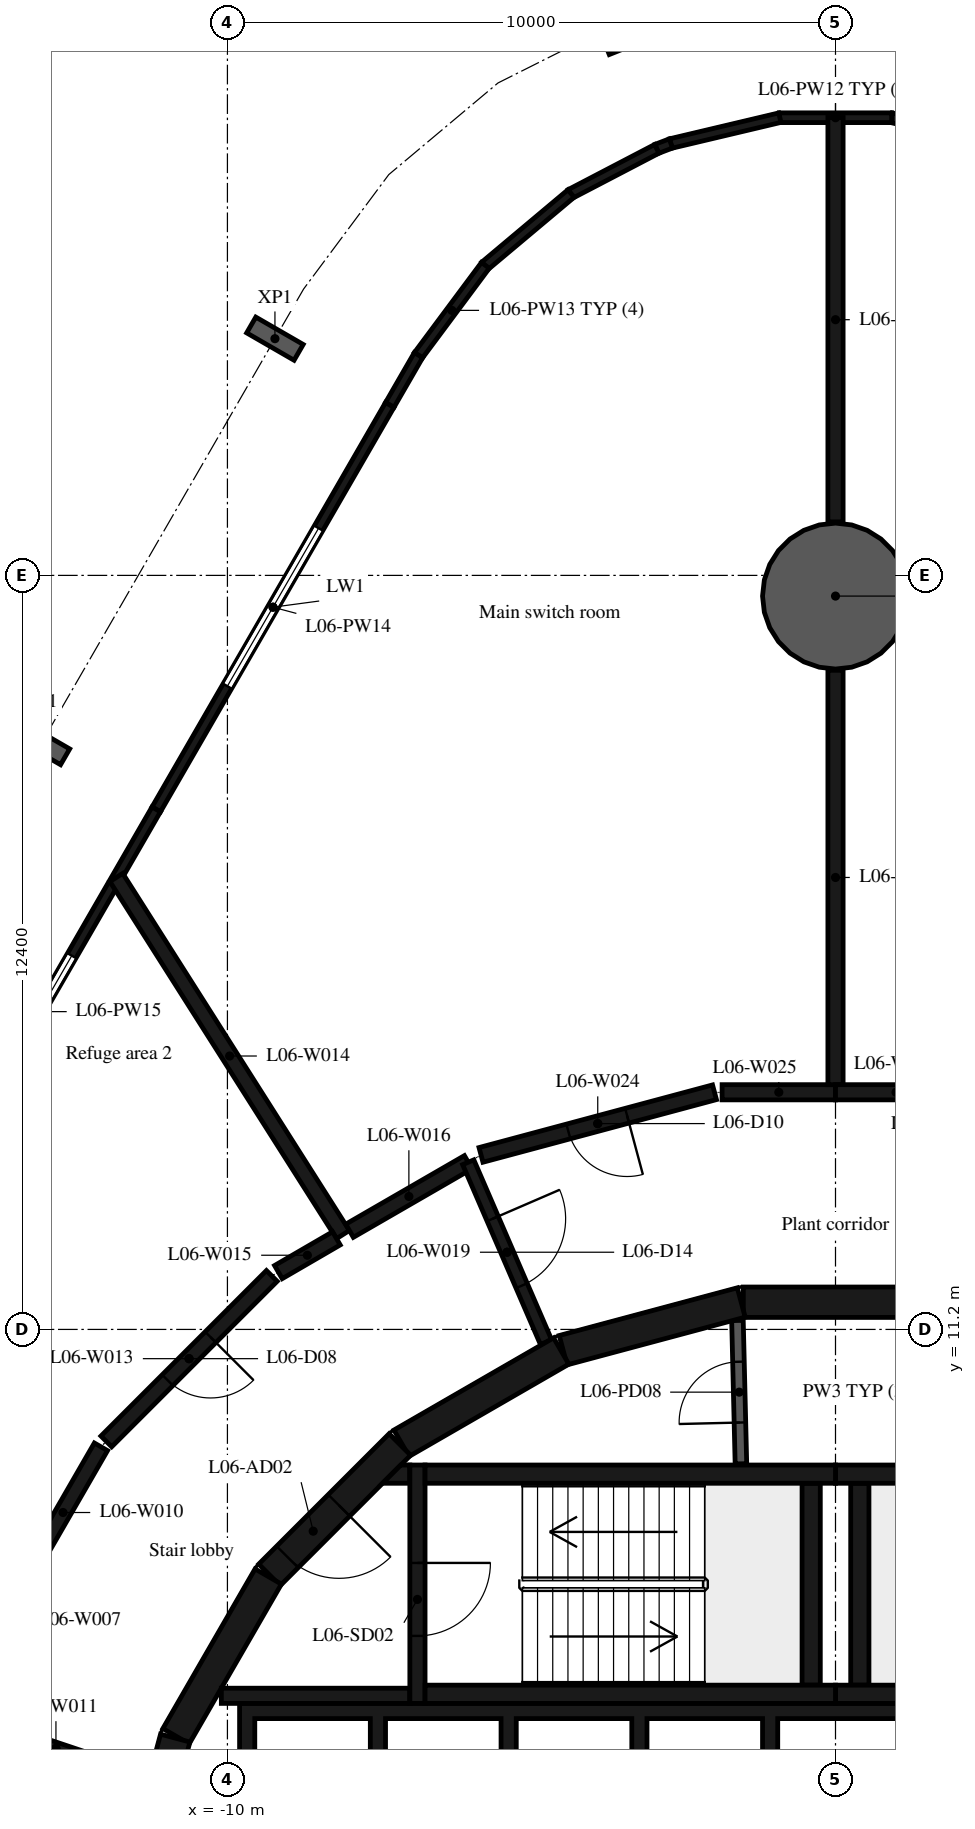
"""IFC4 building model, lengths in metres.
Left out: names, types, materials, properties, quantities, classifications, styles, units other than length and angle.
Written with IfcOpenShell. Run it as: python <this file> out.ifc"""

import sys

from ifc_helpers import new_model, si_unit, direction, frame, frame_2d, origin, origin_2d, place, context, subcontext, project, spatial, polyline, rectangle, hollow_circle, i_section, outline, extrude, element, fill, save


model = new_model("IFC4")
c1 = context("Model", 3, precision=1e-05, world=origin(), true_north=direction((0.0, 1.0)))
c2 = subcontext(c1, "Body", "Model", "MODEL_VIEW")
j1 = project(units=[si_unit("LENGTHUNIT", "METRE"), si_unit("PLANEANGLEUNIT", "RADIAN")], contexts=[c1])
p1 = place(None, origin())
s1 = spatial("IfcSite", under=j1, at=p1, CompositionType="ELEMENT")
p2 = place(p1, origin())
s2 = spatial("IfcBuilding", under=s1, at=p2, CompositionType="ELEMENT")
p3 = place(p2, frame((0.0, 0.0, 33.0)))
s3 = spatial("IfcBuildingStorey", under=s2, at=p3, CompositionType="ELEMENT", Elevation=33.0)
p4 = place(p3, frame((0.0, 23.26, -0.45), z_axis=(0.0, 0.0, 1.0), x_axis=(1.0, 0.0, 0.0)))
e1 = element("IfcColumn", 1, at=p4, inside=s3, PredefinedType="COLUMN", context=c2, shape_type="SweptSolid", body=[
    extrude(hollow_circle(Radius=1.2, WallThickness=0.06, at=origin_2d()), origin(), (0.0, 0.0, 1.0), 5.4),
])
for number, where, z_axis, x_axis in (
    (2, (-3.748, 32.639, -0.45), (0.0, 0.0, 1.0), (0.929, 0.371, 0.0)),
    (3, (-9.219, 27.493, -0.45), (0.0, 0.0, 1.0), (0.5, 0.866, 0.0)),
    (4, (-13.059, 20.842, -0.45), (0.0, 0.0, 1.0), (0.5, 0.866, 0.0)),
):
    element("IfcColumn", number, at=place(p3, frame(where, z_axis=z_axis, x_axis=x_axis)), inside=s3, PredefinedType="COLUMN", context=c2, shape_type="SweptSolid", body=[
        extrude(i_section(OverallWidth=0.3, OverallDepth=0.9, WebThickness=0.019, FlangeThickness=0.035, FilletRadius=0.03, at=origin_2d()), origin(), (0.0, 0.0, 1.0), 5.4),
    ])
p5 = place(p3, frame((2.711, 30.702, 0.0), z_axis=(0.0, 0.0, 1.0), x_axis=(-0.973077946325, 0.230476268575, 0.0)))
e5 = element("IfcWall", 5, at=p5, inside=s3, PredefinedType="STANDARD", context=c2, shape_type="SweptSolid", body=[
    extrude(rectangle(XDim=1.846, YDim=0.16, at=frame_2d((0.923, 0.0))), origin(), (0.0, 0.0, 1.0), 4.95),
])
p6 = place(p3, frame((0.924, 31.126, 0.0), z_axis=(0.0, 0.0, 1.0), x_axis=(-1.0, 0.0, 0.0)))
e6 = element("IfcWall", 6, at=p6, inside=s3, PredefinedType="STANDARD", context=c2, shape_type="SweptSolid", body=[
    extrude(rectangle(XDim=1.848, YDim=0.16, at=frame_2d((0.924, 0.0))), origin(), (0.0, 0.0, 1.0), 4.95),
])
p7 = place(p3, frame((-0.915, 31.127, 0.0), z_axis=(0.0, 0.0, 1.0), x_axis=(-0.973077946325, -0.230476268575, 0.0)))
e7 = element("IfcWall", 7, at=p7, inside=s3, PredefinedType="STANDARD", context=c2, shape_type="SweptSolid", body=[
    extrude(rectangle(XDim=1.846, YDim=0.16, at=frame_2d((0.923, 0.0))), origin(), (0.0, 0.0, 1.0), 4.95),
])
p8 = place(p3, frame((-2.706, 30.703, 0.0), z_axis=(0.0, 0.0, 1.0), x_axis=(-0.934301433369, -0.356483985059, 0.0)))
e8 = element("IfcWall", 8, at=p8, inside=s3, PredefinedType="STANDARD", context=c2, shape_type="SweptSolid", body=[
    extrude(rectangle(XDim=0.249, YDim=0.16, at=frame_2d((0.125, 0.0))), origin(), (0.0, 0.0, 1.0), 4.95),
])
p9 = place(p3, frame((-2.939, 30.614, 0.0), z_axis=(0.0, 0.0, 1.0), x_axis=(-0.886563052372, -0.462607775734, 0.0)))
e9 = element("IfcWall", 9, at=p9, inside=s3, PredefinedType="STANDARD", context=c2, shape_type="SweptSolid", body=[
    extrude(rectangle(XDim=1.598, YDim=0.16, at=frame_2d((0.799, 0.0))), origin(), (0.0, 0.0, 1.0), 4.95),
])
p10 = place(p3, frame((-4.349, 29.88, 0.0), z_axis=(0.0, 0.0, 1.0), x_axis=(-0.766050926865, -0.64277988258, 0.0)))
e10 = element("IfcWall", 10, at=p10, inside=s3, PredefinedType="STANDARD", context=c2, shape_type="SweptSolid", body=[
    extrude(rectangle(XDim=1.848, YDim=0.16, at=frame_2d((0.924, 0.0))), origin(), (0.0, 0.0, 1.0), 4.95),
])
p11 = place(p3, frame((-5.758, 28.698, 0.0), z_axis=(0.0, 0.0, 1.0), x_axis=(-0.597202782017, -0.802090292393, 0.0)))
e11 = element("IfcWall", 11, at=p11, inside=s3, PredefinedType="STANDARD", context=c2, shape_type="SweptSolid", body=[
    extrude(rectangle(XDim=1.846, YDim=0.16, at=frame_2d((0.923, 0.0))), origin(), (0.0, 0.0, 1.0), 4.95),
])
p12 = place(p3, frame((-6.858, 27.222, 0.0), z_axis=(0.0, 0.0, 1.0), x_axis=(-0.499916178513, -0.866073792734, 0.0)))
e12 = element("IfcWall", 12, at=p12, inside=s3, PredefinedType="STANDARD", context=c2, shape_type="SweptSolid", body=[
    extrude(rectangle(XDim=0.946, YDim=0.16, at=frame_2d((0.473, 0.0))), origin(), (0.0, 0.0, 1.0), 4.95),
])
p13 = place(p3, frame((-7.331, 26.403, 0.0), z_axis=(0.0, 0.0, 1.0), x_axis=(-0.500005879718, -0.866022009101, 0.0)))
e13 = element("IfcWall", 13, at=p13, inside=s3, PredefinedType="STANDARD", context=c2, shape_type="SweptSolid", body=[
    extrude(rectangle(XDim=7.68, YDim=0.16, at=frame_2d((3.84, 0.0))), origin(), (0.0, 0.0, 1.0), 4.95),
])
p14 = place(p13, frame((2.34, 0.0, 1.0)))
e14 = element("IfcOpeningElement", 14, at=p14, cuts=e13, PredefinedType="OPENING", context=c2, shape_type="SweptSolid", body=[
    extrude(rectangle(XDim=3.0, YDim=2.2, at=frame_2d((1.5, 1.1))), frame((0.0, 0.09, 0.0), z_axis=(0.0, -1.0, 0.0), x_axis=(1.0, 0.0, 0.0)), (0.0, 0.0, 1.0), 0.18),
])
p15 = place(p3, frame((-11.171, 19.752, 0.0), z_axis=(0.0, 0.0, 1.0), x_axis=(-0.500005879718, -0.866022009101, 0.0)))
e15 = element("IfcWall", 15, at=p15, inside=s3, PredefinedType="STANDARD", context=c2, shape_type="SweptSolid", body=[
    extrude(rectangle(XDim=7.68, YDim=0.16, at=frame_2d((3.84, 0.0))), origin(), (0.0, 0.0, 1.0), 4.95),
])
p16 = place(p15, frame((2.778, 0.0, 1.0)))
e16 = element("IfcOpeningElement", 16, at=p16, cuts=e15, PredefinedType="OPENING", context=c2, shape_type="SweptSolid", body=[
    extrude(rectangle(XDim=3.0, YDim=2.2, at=frame_2d((1.5, 1.1))), frame((0.0, 0.09, 0.0), z_axis=(0.0, -1.0, 0.0), x_axis=(1.0, 0.0, 0.0)), (0.0, 0.0, 1.0), 0.18),
])
for number, where, z_axis, x_axis in (
    (17, (1.516, 11.647, 0.0), (0.0, 0.0, 1.0), (-1.0, 0.0, 0.0)),
    (18, (-1.55, 11.643, 0.0), (0.0, 0.0, 1.0), (-0.966, -0.259, 0.0)),
    (19, (-4.51, 10.845, 0.0), (0.0, 0.0, 1.0), (-0.866, -0.5, 0.0)),
):
    element("IfcWall", number, at=place(p3, frame(where, z_axis=z_axis, x_axis=x_axis)), inside=s3, PredefinedType="SHEAR", context=c2, shape_type="SweptSolid", body=[
        extrude(rectangle(XDim=3.033, YDim=0.5, at=frame_2d((1.516, 0.0))), origin(), (0.0, 0.0, 1.0), 4.95),
    ])
p17 = place(p3, frame((-7.164, 9.308, 0.0), z_axis=(0.0, 0.0, 1.0), x_axis=(-0.707106781187, -0.707106781187, 0.0)))
e20 = element("IfcWall", 20, at=p17, inside=s3, PredefinedType="SHEAR", context=c2, shape_type="SweptSolid", body=[
    extrude(rectangle(XDim=3.032, YDim=0.5, at=frame_2d((1.516, 0.0))), origin(), (0.0, 0.0, 1.0), 4.95),
])
p18 = place(p17, frame((1.416, 0.0, 0.0)))
e21 = element("IfcOpeningElement", 21, at=p18, cuts=e20, PredefinedType="OPENING", context=c2, shape_type="SweptSolid", body=[
    extrude(rectangle(XDim=1.2, YDim=2.1, at=frame_2d((0.6, 1.05))), frame((0.0, 0.26, 0.0), z_axis=(0.0, -1.0, 0.0), x_axis=(1.0, 0.0, 0.0)), (0.0, 0.0, 1.0), 0.52),
])
for number, where, z_axis, x_axis in (
    (22, (-9.329, 7.137, 0.0), (0.0, 0.0, 1.0), (-0.5, -0.866, 0.0)),
    (23, (-10.858, 4.479, 0.0), (0.0, 0.0, 1.0), (-0.259, -0.966, 0.0)),
):
    element("IfcWall", number, at=place(p3, frame(where, z_axis=z_axis, x_axis=x_axis)), inside=s3, PredefinedType="SHEAR", context=c2, shape_type="SweptSolid", body=[
        extrude(rectangle(XDim=3.033, YDim=0.5, at=frame_2d((1.516, 0.0))), origin(), (0.0, 0.0, 1.0), 4.95),
    ])
for number, where, z_axis, x_axis in (
    (24, (0.0, 5.2, 0.0), (0.0, 0.0, 1.0), (1.0, 0.0, 0.0)),
    (25, (0.0, 8.82, 0.0), (0.0, 0.0, 1.0), (1.0, 0.0, 0.0)),
):
    element("IfcWall", number, at=place(p3, frame(where, z_axis=z_axis, x_axis=x_axis)), inside=s3, PredefinedType="SHEAR", context=c2, shape_type="SweptSolid", body=[
        extrude(rectangle(XDim=6.75, YDim=0.3, at=frame_2d((3.375, 0.0))), origin(), (0.0, 0.0, 1.0), 4.95),
    ])
p19 = place(p3, frame((0.4, 5.35, 0.0), z_axis=(0.0, 0.0, 1.0), x_axis=(0.0, 1.0, 0.0)))
e26 = element("IfcWall", 26, at=p19, inside=s3, PredefinedType="SHEAR", context=c2, shape_type="SweptSolid", body=[
    extrude(rectangle(XDim=3.32, YDim=0.3, at=frame_2d((1.66, 0.0))), origin(), (0.0, 0.0, 1.0), 4.95),
])
for number, where, z_axis, x_axis in (
    (27, (-6.75, 5.2, 0.0), (0.0, 0.0, 1.0), (1.0, 0.0, 0.0)),
    (28, (-6.75, 8.82, 0.0), (0.0, 0.0, 1.0), (1.0, 0.0, 0.0)),
):
    element("IfcWall", number, at=place(p3, frame(where, z_axis=z_axis, x_axis=x_axis)), inside=s3, PredefinedType="SHEAR", context=c2, shape_type="SweptSolid", body=[
        extrude(rectangle(XDim=6.75, YDim=0.3, at=frame_2d((3.375, 0.0))), origin(), (0.0, 0.0, 1.0), 4.95),
    ])
p20 = place(p3, frame((-0.4, 5.35, 0.0), z_axis=(0.0, 0.0, 1.0), x_axis=(0.0, 1.0, 0.0)))
e29 = element("IfcWall", 29, at=p20, inside=s3, PredefinedType="SHEAR", context=c2, shape_type="SweptSolid", body=[
    extrude(rectangle(XDim=3.32, YDim=0.3, at=frame_2d((1.66, 0.0))), origin(), (0.0, 0.0, 1.0), 4.95),
])
p21 = place(p3, frame((-6.875, 8.97, 0.0), z_axis=(0.0, 0.0, 1.0), x_axis=(0.0, -1.0, 0.0)))
e30 = element("IfcWall", 30, at=p21, inside=s3, PredefinedType="SHEAR", context=c2, shape_type="SweptSolid", body=[
    extrude(rectangle(XDim=3.92, YDim=0.25, at=frame_2d((1.96, 0.0))), origin(), (0.0, 0.0, 1.0), 4.95),
])
p22 = place(p21, frame((1.61, 0.0, 0.0)))
e31 = element("IfcOpeningElement", 31, at=p22, cuts=e30, PredefinedType="OPENING", context=c2, shape_type="SweptSolid", body=[
    extrude(rectangle(XDim=1.2, YDim=2.1, at=frame_2d((0.6, 1.05))), frame((0.0, 0.135, 0.0), z_axis=(0.0, -1.0, 0.0), x_axis=(1.0, 0.0, 0.0)), (0.0, 0.0, 1.0), 0.27),
])
p23 = place(p3, frame((-7.0, 5.175, 0.0), z_axis=(0.0, 0.0, 1.0), x_axis=(-1.0, 0.0, 0.0)))
e32 = element("IfcWall", 32, at=p23, inside=s3, PredefinedType="SHEAR", context=c2, shape_type="SweptSolid", body=[
    extrude(rectangle(XDim=3.1, YDim=0.25, at=frame_2d((1.55, 0.0))), origin(), (0.0, 0.0, 1.0), 4.95),
])
p24 = place(p3, origin())
e33 = element("IfcWall", 33, at=p24, inside=s3, PredefinedType="SHEAR", context=c2, shape_type="SweptSolid", body=[
    extrude(outline(polyline([(-7.148, 8.97), (-7.0, 8.97), (-7.0, 8.67), (-7.448, 8.67), (-7.148, 8.97)])), origin(), (0.0, 0.0, 1.0), 4.95),
])
p25 = place(p3, origin())
e34 = element("IfcWall", 34, at=p25, inside=s3, PredefinedType="SHEAR", context=c2, shape_type="SweptSolid", body=[
    extrude(outline(polyline([(-9.55, 4.8), (-7.65, 4.8), (-7.65, 1.9), (-7.4, 1.9), (-7.4, 4.8), (-5.5, 4.8), (-5.5, 1.9), (-5.25, 1.9), (-5.25, 4.8), (-3.35, 4.8), (-3.35, 1.9), (-3.1, 1.9), (-3.1, 4.8), (-1.2, 4.8), (-1.2, 1.9), (-0.95, 1.9), (-0.95, 4.8), (3.1, 4.8), (3.1, 1.9), (3.35, 1.9), (3.35, 4.8), (5.25, 4.8), (5.25, 1.9), (5.5, 1.9), (5.5, 4.8), (7.4, 4.8), (7.4, 1.9), (7.65, 1.9), (7.65, 4.8), (9.55, 4.8), (9.55, 1.9), (9.8, 1.9), (9.8, 4.8), (9.8, 5.05), (-9.8, 5.05), (-9.8, 4.8), (-9.8, 1.9), (-9.55, 1.9), (-9.55, 4.8)])), origin(), (0.0, 0.0, 1.0), 4.95),
])
p26 = place(p3, frame((-1.555, 8.99, 0.0), z_axis=(0.0, 0.0, 1.0), x_axis=(-0.024125549686, 0.999708936567, 0.0)))
e35 = element("IfcWall", 35, at=p26, inside=s3, PredefinedType="PARTITIONING", context=c2, shape_type="SweptSolid", body=[
    extrude(rectangle(XDim=2.358, YDim=0.19, at=frame_2d((1.179, 0.0))), origin(), (0.0, 0.0, 1.0), 4.95),
])
p27 = place(p26, frame((0.679, 0.0, 0.0)))
e36 = element("IfcOpeningElement", 36, at=p27, cuts=e35, PredefinedType="OPENING", context=c2, shape_type="SweptSolid", body=[
    extrude(rectangle(XDim=1.0, YDim=2.4, at=frame_2d((0.5, 1.2))), frame((0.0, 0.105, 0.0), z_axis=(0.0, -1.0, 0.0), x_axis=(1.0, 0.0, 0.0)), (0.0, 0.0, 1.0), 0.21),
])
p28 = place(p3, frame((-12.08, 9.27, 0.0), z_axis=(0.0, 0.0, 1.0), x_axis=(-0.499821239653, -0.866128586522, 0.0)))
e37 = element("IfcWall", 37, at=p28, inside=s3, PredefinedType="PARTITIONING", context=c2, shape_type="SweptSolid", body=[
    extrude(rectangle(XDim=2.496, YDim=0.25, at=frame_2d((1.248, 0.0))), origin(), (0.0, 0.0, 1.0), 4.95),
])
p29 = place(p3, frame((-11.3, 3.8, 0.0), z_axis=(0.0, 0.0, 1.0), x_axis=(-0.94805712629, 0.318100118345, 0.0)))
e38 = element("IfcWall", 38, at=p29, inside=s3, PredefinedType="PARTITIONING", context=c2, shape_type="SweptSolid", body=[
    extrude(rectangle(XDim=3.207, YDim=0.2, at=frame_2d((1.603, 0.0))), origin(), (0.0, 0.0, 1.0), 4.95),
])
p30 = place(p29, frame((1.003, 0.0, 0.0)))
e39 = element("IfcOpeningElement", 39, at=p30, cuts=e38, PredefinedType="OPENING", context=c2, shape_type="SweptSolid", body=[
    extrude(rectangle(XDim=1.2, YDim=2.1, at=frame_2d((0.6, 1.05))), frame((0.0, 0.11, 0.0), z_axis=(0.0, -1.0, 0.0), x_axis=(1.0, 0.0, 0.0)), (0.0, 0.0, 1.0), 0.22),
])
p31 = place(p3, frame((-9.27, 12.08, 0.0), z_axis=(0.0, 0.0, 1.0), x_axis=(-0.707106781187, -0.707106781187, 0.0)))
e40 = element("IfcWall", 40, at=p31, inside=s3, PredefinedType="PARTITIONING", context=c2, shape_type="SweptSolid", body=[
    extrude(rectangle(XDim=3.849, YDim=0.25, at=frame_2d((1.925, 0.0))), origin(), (0.0, 0.0, 1.0), 4.95),
])
p32 = place(p31, frame((1.425, 0.0, 0.0)))
e41 = element("IfcOpeningElement", 41, at=p32, cuts=e40, PredefinedType="OPENING", context=c2, shape_type="SweptSolid", body=[
    extrude(rectangle(XDim=1.0, YDim=2.1, at=frame_2d((0.5, 1.05))), frame((0.0, 0.135, 0.0), z_axis=(0.0, -1.0, 0.0), x_axis=(1.0, 0.0, 0.0)), (0.0, 0.0, 1.0), 0.27),
])
p33 = place(p3, frame((-8.1, 12.76, 0.0), z_axis=(0.0, 0.0, 1.0), x_axis=(-0.535848500159, 0.844314150585, 0.0)))
e42 = element("IfcWall", 42, at=p33, inside=s3, PredefinedType="PARTITIONING", context=c2, shape_type="SweptSolid", body=[
    extrude(rectangle(XDim=6.955, YDim=0.25, at=frame_2d((3.478, 0.0))), origin(), (0.0, 0.0, 1.0), 4.95),
])
p34 = place(p3, frame((-8.208, 12.697, 0.0), z_axis=(0.0, 0.0, 1.0), x_axis=(-0.86455637663, -0.502535841138, 0.0)))
e43 = element("IfcWall", 43, at=p34, inside=s3, PredefinedType="PARTITIONING", context=c2, shape_type="SweptSolid", body=[
    extrude(rectangle(XDim=1.103, YDim=0.25, at=frame_2d((0.552, 0.0))), origin(), (0.0, 0.0, 1.0), 4.95),
])
p35 = place(p3, frame((-7.992, 12.823, 0.0), z_axis=(0.0, 0.0, 1.0), x_axis=(0.865900522319, 0.500216238688, 0.0)))
e44 = element("IfcWall", 44, at=p35, inside=s3, PredefinedType="PARTITIONING", context=c2, shape_type="SweptSolid", body=[
    extrude(rectangle(XDim=2.254, YDim=0.25, at=frame_2d((1.127, 0.0))), origin(), (0.0, 0.0, 1.0), 4.95),
])
p36 = place(p3, frame((-6.04, 13.949, 0.0), z_axis=(0.0, 0.0, 1.0), x_axis=(0.396905977672, -0.917859272922, 0.0)))
e45 = element("IfcWall", 45, at=p36, inside=s3, PredefinedType="PARTITIONING", context=c2, shape_type="SweptSolid", body=[
    extrude(rectangle(XDim=3.224, YDim=0.2, at=frame_2d((1.612, 0.0))), origin(), (0.0, 0.0, 1.0), 4.95),
])
p37 = place(p36, frame((1.012, 0.0, 0.0)))
e46 = element("IfcOpeningElement", 46, at=p37, cuts=e45, PredefinedType="OPENING", context=c2, shape_type="SweptSolid", body=[
    extrude(rectangle(XDim=1.2, YDim=2.1, at=frame_2d((0.6, 1.05))), frame((0.0, 0.11, 0.0), z_axis=(0.0, -1.0, 0.0), x_axis=(1.0, 0.0, 0.0)), (0.0, 0.0, 1.0), 0.22),
])
p38 = place(p3, frame((-1.99, 15.1, 0.0), z_axis=(0.0, 0.0, 1.0), x_axis=(-0.965857829358, -0.259072679895, 0.0)))
e47 = element("IfcWall", 47, at=p38, inside=s3, PredefinedType="PARTITIONING", context=c2, shape_type="SweptSolid", body=[
    extrude(rectangle(XDim=3.976, YDim=0.25, at=frame_2d((1.988, 0.0))), origin(), (0.0, 0.0, 1.0), 4.95),
])
p39 = place(p38, frame((1.488, 0.0, 0.0)))
e48 = element("IfcOpeningElement", 48, at=p39, cuts=e47, PredefinedType="OPENING", context=c2, shape_type="SweptSolid", body=[
    extrude(rectangle(XDim=1.0, YDim=2.1, at=frame_2d((0.5, 1.05))), frame((0.0, 0.135, 0.0), z_axis=(0.0, -1.0, 0.0), x_axis=(1.0, 0.0, 0.0)), (0.0, 0.0, 1.0), 0.27),
])
p40 = place(p3, frame((0.0, 15.1, 0.0), z_axis=(0.0, 0.0, 1.0), x_axis=(-1.0, 0.0, 0.0)))
e49 = element("IfcWall", 49, at=p40, inside=s3, PredefinedType="PARTITIONING", context=c2, shape_type="SweptSolid", body=[
    extrude(rectangle(XDim=1.865, YDim=0.25, at=frame_2d((0.933, 0.0))), origin(), (0.0, 0.0, 1.0), 4.95),
])
p41 = place(p3, frame((0.0, 15.225, 0.0), z_axis=(0.0, 0.0, 1.0), x_axis=(0.0, 1.0, 0.0)))
e50 = element("IfcWall", 50, at=p41, inside=s3, PredefinedType="PARTITIONING", context=c2, shape_type="SweptSolid", body=[
    extrude(rectangle(XDim=6.815, YDim=0.25, at=frame_2d((3.407, 0.0))), origin(), (0.0, 0.0, 1.0), 4.95),
])
p42 = place(p3, frame((0.0, 24.48, 0.0), z_axis=(0.0, 0.0, 1.0), x_axis=(0.0, 1.0, 0.0)))
e51 = element("IfcWall", 51, at=p42, inside=s3, PredefinedType="PARTITIONING", context=c2, shape_type="SweptSolid", body=[
    extrude(rectangle(XDim=6.65, YDim=0.25, at=frame_2d((3.325, 0.0))), origin(), (0.0, 0.0, 1.0), 4.95),
])
p43 = place(p3, frame((1.99, 15.1, 0.0), z_axis=(0.0, 0.0, 1.0), x_axis=(-1.0, 0.0, 0.0)))
e52 = element("IfcWall", 52, at=p43, inside=s3, PredefinedType="PARTITIONING", context=c2, shape_type="SweptSolid", body=[
    extrude(rectangle(XDim=1.99, YDim=0.25, at=frame_2d((0.995, 0.0))), origin(), (0.0, 0.0, 1.0), 4.95),
])
p44 = place(p14, origin())
e53 = element("IfcWindow", 53, at=p44, inside=s3, PartitioningType="SINGLE_PANEL", PredefinedType="WINDOW", context=c2, shape_type="SweptSolid", body=[
    extrude(rectangle(XDim=3.0, YDim=2.2, at=frame_2d((1.5, 1.1))), frame((0.0, 0.03, 0.0), z_axis=(0.0, -1.0, 0.0), x_axis=(1.0, 0.0, 0.0)), (0.0, 0.0, 1.0), 0.06),
])
fill(e14, e53)
p45 = place(p16, origin())
e54 = element("IfcWindow", 54, at=p45, inside=s3, PartitioningType="SINGLE_PANEL", PredefinedType="WINDOW", context=c2, shape_type="SweptSolid", body=[
    extrude(rectangle(XDim=3.0, YDim=2.2, at=frame_2d((1.5, 1.1))), frame((0.0, 0.03, 0.0), z_axis=(0.0, -1.0, 0.0), x_axis=(1.0, 0.0, 0.0)), (0.0, 0.0, 1.0), 0.06),
])
fill(e16, e54)
p46 = place(p22, origin())
e55 = element("IfcDoor", 55, at=p46, inside=s3, OperationType="SINGLE_SWING_LEFT", PredefinedType="DOOR", context=c2, shape_type="SweptSolid", body=[
    extrude(rectangle(XDim=1.2, YDim=2.1, at=frame_2d((0.6, 1.05))), frame((0.0, 0.025, 0.0), z_axis=(0.0, -1.0, 0.0), x_axis=(1.0, 0.0, 0.0)), (0.0, 0.0, 1.0), 0.05),
])
fill(e31, e55)
p47 = place(p18, origin())
e56 = element("IfcDoor", 56, at=p47, inside=s3, OperationType="SINGLE_SWING_RIGHT", PredefinedType="DOOR", context=c2, shape_type="SweptSolid", body=[
    extrude(rectangle(XDim=1.2, YDim=2.1, at=frame_2d((0.6, 1.05))), frame((0.0, 0.025, 0.0), z_axis=(0.0, -1.0, 0.0), x_axis=(1.0, 0.0, 0.0)), (0.0, 0.0, 1.0), 0.05),
])
fill(e21, e56)
p48 = place(p27, origin())
e57 = element("IfcDoor", 57, at=p48, inside=s3, OperationType="SINGLE_SWING_LEFT", PredefinedType="DOOR", context=c2, shape_type="SweptSolid", body=[
    extrude(rectangle(XDim=1.0, YDim=2.4, at=frame_2d((0.5, 1.2))), frame((0.0, 0.025, 0.0), z_axis=(0.0, -1.0, 0.0), x_axis=(1.0, 0.0, 0.0)), (0.0, 0.0, 1.0), 0.05),
])
fill(e36, e57)
p49 = place(p32, origin())
e58 = element("IfcDoor", 58, at=p49, inside=s3, OperationType="SINGLE_SWING_LEFT", PredefinedType="DOOR", context=c2, shape_type="SweptSolid", body=[
    extrude(rectangle(XDim=1.0, YDim=2.1, at=frame_2d((0.5, 1.05))), frame((0.0, 0.025, 0.0), z_axis=(0.0, -1.0, 0.0), x_axis=(1.0, 0.0, 0.0)), (0.0, 0.0, 1.0), 0.05),
])
fill(e41, e58)
p50 = place(p39, origin())
e59 = element("IfcDoor", 59, at=p50, inside=s3, OperationType="SINGLE_SWING_LEFT", PredefinedType="DOOR", context=c2, shape_type="SweptSolid", body=[
    extrude(rectangle(XDim=1.0, YDim=2.1, at=frame_2d((0.5, 1.05))), frame((0.0, 0.025, 0.0), z_axis=(0.0, -1.0, 0.0), x_axis=(1.0, 0.0, 0.0)), (0.0, 0.0, 1.0), 0.05),
])
fill(e48, e59)
p51 = place(p37, origin())
e60 = element("IfcDoor", 60, at=p51, inside=s3, OperationType="SINGLE_SWING_LEFT", PredefinedType="DOOR", context=c2, shape_type="SweptSolid", body=[
    extrude(rectangle(XDim=1.2, YDim=2.1, at=frame_2d((0.6, 1.05))), frame((0.0, 0.025, 0.0), z_axis=(0.0, -1.0, 0.0), x_axis=(1.0, 0.0, 0.0)), (0.0, 0.0, 1.0), 0.05),
])
fill(e46, e60)
p52 = place(p30, origin())
e61 = element("IfcDoor", 61, at=p52, inside=s3, OperationType="SINGLE_SWING_LEFT", PredefinedType="DOOR", context=c2, shape_type="SweptSolid", body=[
    extrude(rectangle(XDim=1.2, YDim=2.1, at=frame_2d((0.6, 1.05))), frame((0.0, 0.025, 0.0), z_axis=(0.0, -1.0, 0.0), x_axis=(1.0, 0.0, 0.0)), (0.0, 0.0, 1.0), 0.05),
])
fill(e39, e61)
save(model, sys.argv[1])
